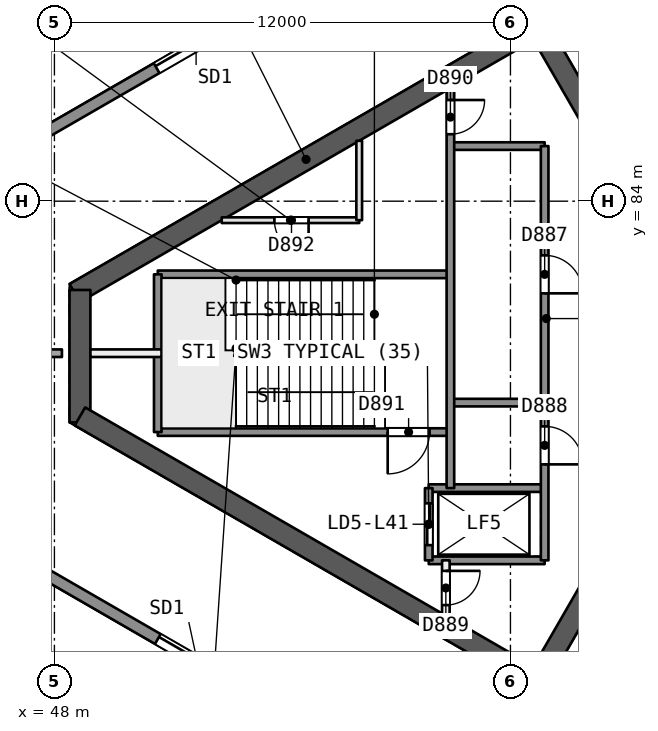
"""IFC4 building model, lengths in metres.
Left out: names, types, materials, properties, quantities, classifications, styles, units other than length and angle.
Written with IfcOpenShell. Run it as: python <this file> out.ifc"""

import sys

from ifc_helpers import new_model, si_unit, direction, frame, frame_2d, origin, place, context, subcontext, project, spatial, rectangle, extrude, element, fill, save


model = new_model("IFC4")
c1 = context("Model", 3, precision=1e-05, world=origin(), true_north=direction((0.0, 1.0)))
c2 = subcontext(c1, "Body", "Model", "MODEL_VIEW")
j1 = project(units=[si_unit("LENGTHUNIT", "METRE"), si_unit("PLANEANGLEUNIT", "RADIAN")], contexts=[c1])
p1 = place(None, origin())
s1 = spatial("IfcSite", under=j1, at=p1, CompositionType="ELEMENT")
p2 = place(p1, origin())
s2 = spatial("IfcBuilding", under=s1, at=p2, CompositionType="ELEMENT")
p3 = place(p2, frame((0.0, 0.0, 171.1)))
s3 = spatial("IfcBuildingStorey", under=s2, at=p3, CompositionType="ELEMENT", Elevation=171.1)
p4 = place(p3, frame((65.682, 80.0, 0.0), z_axis=(0.0, 0.0, 1.0), x_axis=(-0.500000202252, 0.866025287014, 0.0)))
e1 = element("IfcWall", 1, at=p4, inside=s3, PredefinedType="SHEAR", context=c2, shape_type="SweptSolid", body=[
    extrude(rectangle(XDim=10.221, YDim=0.55, at=frame_2d((5.111, 0.0))), origin(), (0.0, 0.0, 1.0), 3.7),
])
p5 = place(p4, frame((0.791, 0.0, 0.0)))
e2 = element("IfcOpeningElement", 2, at=p5, cuts=e1, PredefinedType="OPENING", context=c2, shape_type="SweptSolid", body=[
    extrude(rectangle(XDim=1.2, YDim=2.1, at=frame_2d((0.6, 1.05))), frame((0.0, 0.286, 0.0), z_axis=(0.0, -1.0, 0.0), x_axis=(1.0, 0.0, 0.0)), (0.0, 0.0, 1.0), 0.571),
])
p6 = place(p3, frame((60.709, 88.614, 0.0), z_axis=(0.0, 0.0, 1.0), x_axis=(-0.866020164116, -0.500009075263, 0.0)))
e3 = element("IfcWall", 3, at=p6, inside=s3, PredefinedType="SHEAR", context=c2, shape_type="SweptSolid", body=[
    extrude(rectangle(XDim=14.058, YDim=0.55, at=frame_2d((7.029, 0.0))), origin(), (0.0, 0.0, 1.0), 3.7),
])
p7 = place(p3, frame((48.672, 81.664, 0.0), z_axis=(0.0, 0.0, 1.0), x_axis=(0.0, -1.0, 0.0)))
e4 = element("IfcWall", 4, at=p7, inside=s3, PredefinedType="SHEAR", context=c2, shape_type="SweptSolid", body=[
    extrude(rectangle(XDim=3.487, YDim=0.55, at=frame_2d((1.743, 0.0))), origin(), (0.0, 0.0, 1.0), 3.7),
])
p8 = place(p3, frame((48.672, 78.336, 0.0), z_axis=(0.0, 0.0, 1.0), x_axis=(0.866023530946, -0.500003243837, 0.0)))
e5 = element("IfcWall", 5, at=p8, inside=s3, PredefinedType="SHEAR", context=c2, shape_type="SweptSolid", body=[
    extrude(rectangle(XDim=14.175, YDim=0.55, at=frame_2d((7.087, 0.0))), origin(), (0.0, 0.0, 1.0), 3.7),
])
p9 = place(p3, frame((60.709, 71.386, 0.0), z_axis=(0.0, 0.0, 1.0), x_axis=(0.500015938302, 0.866016201606, 0.0)))
e6 = element("IfcWall", 6, at=p9, inside=s3, PredefinedType="SHEAR", context=c2, shape_type="SweptSolid", body=[
    extrude(rectangle(XDim=10.105, YDim=0.55, at=frame_2d((5.053, 0.0))), origin(), (0.0, 0.0, 1.0), 3.7),
])
p10 = place(p9, frame((7.955, 0.0, 0.0)))
e7 = element("IfcOpeningElement", 7, at=p10, cuts=e6, PredefinedType="OPENING", context=c2, shape_type="SweptSolid", body=[
    extrude(rectangle(XDim=1.2, YDim=2.1, at=frame_2d((0.6, 1.05))), frame((0.0, 0.286, 0.0), z_axis=(0.0, -1.0, 0.0), x_axis=(1.0, 0.0, 0.0)), (0.0, 0.0, 1.0), 0.571),
])
p11 = place(p3, frame((66.129, 83.077, 0.0), z_axis=(0.0, 0.0, 1.0), x_axis=(-0.5000018851, 0.866024315419, 0.0)))
e8 = element("IfcWall", 8, at=p11, inside=s3, PredefinedType="PARTITIONING", context=c2, shape_type="SweptSolid", body=[
    extrude(rectangle(XDim=9.0, YDim=0.2, at=frame_2d((4.5, 0.0))), origin(), (0.0, 0.0, 1.0), 3.25),
])
p12 = place(p3, frame((42.599, 80.0, 0.0), z_axis=(0.0, 0.0, 1.0), x_axis=(1.0, 0.0, 0.0)))
e9 = element("IfcWall", 9, at=p12, inside=s3, PredefinedType="PARTITIONING", context=c2, shape_type="SweptSolid", body=[
    extrude(rectangle(XDim=5.599, YDim=0.2, at=frame_2d((2.8, 0.0))), origin(), (0.0, 0.0, 1.0), 3.25),
])
p13 = place(p3, frame((42.45, 82.744, 0.0), z_axis=(0.0, 0.0, 1.0), x_axis=(0.866024128163, 0.500002209434, 0.0)))
e10 = element("IfcWall", 10, at=p13, inside=s3, PredefinedType="SOLIDWALL", context=c2, shape_type="SweptSolid", body=[
    extrude(rectangle(XDim=53.635, YDim=0.3, at=frame_2d((26.817, 0.0))), origin(), (0.0, 0.0, 1.0), 3.25),
])
p14 = place(p13, frame((20.473, 0.0, 0.0)))
e11 = element("IfcOpeningElement", 11, at=p14, cuts=e10, PredefinedType="OPENING", context=c2, shape_type="SweptSolid", body=[
    extrude(rectangle(XDim=2.4, YDim=2.4, at=frame_2d((1.2, 1.2))), frame((0.0, 0.161, 0.0), z_axis=(0.0, -1.0, 0.0), x_axis=(1.0, 0.0, 0.0)), (0.0, 0.0, 1.0), 0.321),
])
p15 = place(p13, frame((9.514, 0.0, 0.0)))
e12 = element("IfcOpeningElement", 12, at=p15, cuts=e10, PredefinedType="OPENING", context=c2, shape_type="SweptSolid", body=[
    extrude(rectangle(XDim=2.4, YDim=2.4, at=frame_2d((1.2, 1.2))), frame((0.0, 0.161, 0.0), z_axis=(0.0, -1.0, 0.0), x_axis=(1.0, 0.0, 0.0)), (0.0, 0.0, 1.0), 0.321),
])
p16 = place(p13, frame((40.628, 0.0, 0.0)))
e13 = element("IfcOpeningElement", 13, at=p16, cuts=e10, PredefinedType="OPENING", context=c2, shape_type="SweptSolid", body=[
    extrude(rectangle(XDim=2.4, YDim=2.4, at=frame_2d((1.2, 1.2))), frame((0.0, 0.161, 0.0), z_axis=(0.0, -1.0, 0.0), x_axis=(1.0, 0.0, 0.0)), (0.0, 0.0, 1.0), 0.321),
])
p17 = place(p13, frame((27.632, 0.0, 0.9)))
e14 = element("IfcOpeningElement", 14, at=p17, cuts=e10, PredefinedType="OPENING", context=c2, shape_type="SweptSolid", body=[
    extrude(rectangle(XDim=1.8, YDim=1.5, at=frame_2d((0.9, 0.75))), frame((0.0, 0.161, 0.0), z_axis=(0.0, -1.0, 0.0), x_axis=(1.0, 0.0, 0.0)), (0.0, 0.0, 1.0), 0.321),
])
p18 = place(p13, frame((24.826, 0.0, 0.9)))
e15 = element("IfcOpeningElement", 15, at=p18, cuts=e10, PredefinedType="OPENING", context=c2, shape_type="SweptSolid", body=[
    extrude(rectangle(XDim=1.8, YDim=1.5, at=frame_2d((0.9, 0.75))), frame((0.0, 0.161, 0.0), z_axis=(0.0, -1.0, 0.0), x_axis=(1.0, 0.0, 0.0)), (0.0, 0.0, 1.0), 0.321),
])
p19 = place(p3, frame((88.899, 50.439, 0.0), z_axis=(0.0, 0.0, 1.0), x_axis=(-0.866024128163, 0.500002209434, 0.0)))
e16 = element("IfcWall", 16, at=p19, inside=s3, PredefinedType="SOLIDWALL", context=c2, shape_type="SweptSolid", body=[
    extrude(rectangle(XDim=53.635, YDim=0.3, at=frame_2d((26.817, 0.0))), origin(), (0.0, 0.0, 1.0), 3.25),
])
p20 = place(p19, frame((30.45, 0.0, 0.0)))
e17 = element("IfcOpeningElement", 17, at=p20, cuts=e16, PredefinedType="OPENING", context=c2, shape_type="SweptSolid", body=[
    extrude(rectangle(XDim=2.4, YDim=2.4, at=frame_2d((1.2, 1.2))), frame((0.0, 0.161, 0.0), z_axis=(0.0, -1.0, 0.0), x_axis=(1.0, 0.0, 0.0)), (0.0, 0.0, 1.0), 0.321),
])
p21 = place(p19, frame((41.683, 0.0, 0.0)))
e18 = element("IfcOpeningElement", 18, at=p21, cuts=e16, PredefinedType="OPENING", context=c2, shape_type="SweptSolid", body=[
    extrude(rectangle(XDim=2.4, YDim=2.4, at=frame_2d((1.2, 1.2))), frame((0.0, 0.161, 0.0), z_axis=(0.0, -1.0, 0.0), x_axis=(1.0, 0.0, 0.0)), (0.0, 0.0, 1.0), 0.321),
])
p22 = place(p19, frame((10.295, 0.0, 0.0)))
e19 = element("IfcOpeningElement", 19, at=p22, cuts=e16, PredefinedType="OPENING", context=c2, shape_type="SweptSolid", body=[
    extrude(rectangle(XDim=2.4, YDim=2.4, at=frame_2d((1.2, 1.2))), frame((0.0, 0.161, 0.0), z_axis=(0.0, -1.0, 0.0), x_axis=(1.0, 0.0, 0.0)), (0.0, 0.0, 1.0), 0.321),
])
p23 = place(p19, frame((24.982, 0.0, 0.9)))
e20 = element("IfcOpeningElement", 20, at=p23, cuts=e16, PredefinedType="OPENING", context=c2, shape_type="SweptSolid", body=[
    extrude(rectangle(XDim=1.8, YDim=1.5, at=frame_2d((0.9, 0.75))), frame((0.0, 0.161, 0.0), z_axis=(0.0, -1.0, 0.0), x_axis=(1.0, 0.0, 0.0)), (0.0, 0.0, 1.0), 0.321),
])
p24 = place(p3, frame((60.9, 85.45, 0.0), z_axis=(0.0, 0.0, 1.0), x_axis=(-1.0, 0.0, 0.0)))
e21 = element("IfcWall", 21, at=p24, inside=s3, PredefinedType="SOLIDWALL", context=c2, shape_type="SweptSolid", body=[
    extrude(rectangle(XDim=2.48, YDim=0.2, at=frame_2d((1.24, 0.0))), origin(), (0.0, 0.0, 1.0), 3.25),
])
p25 = place(p3, frame((56.02, 83.5, 0.0), z_axis=(0.0, 0.0, 1.0), x_axis=(-1.0, 0.0, 0.0)))
e22 = element("IfcWall", 22, at=p25, inside=s3, PredefinedType="PARTITIONING", context=c2, shape_type="SweptSolid", body=[
    extrude(rectangle(XDim=3.618, YDim=0.15, at=frame_2d((1.809, 0.0))), origin(), (0.0, 0.0, 1.0), 3.25),
])
p26 = place(p25, frame((1.332, 0.0, 0.0)))
e23 = element("IfcOpeningElement", 23, at=p26, cuts=e22, PredefinedType="OPENING", context=c2, shape_type="SweptSolid", body=[
    extrude(rectangle(XDim=0.9, YDim=2.1, at=frame_2d((0.45, 1.05))), frame((0.0, 0.085, 0.0), z_axis=(0.0, -1.0, 0.0), x_axis=(1.0, 0.0, 0.0)), (0.0, 0.0, 1.0), 0.171),
])
p27 = place(p3, frame((58.42, 82.075, 0.0), z_axis=(0.0, 0.0, 1.0), x_axis=(-1.0, 0.0, 0.0)))
e24 = element("IfcWall", 24, at=p27, inside=s3, PredefinedType="SOLIDWALL", context=c2, shape_type="SweptSolid", body=[
    extrude(rectangle(XDim=7.7, YDim=0.2, at=frame_2d((3.85, 0.0))), origin(), (0.0, 0.0, 1.0), 3.25),
])
p28 = place(p3, frame((50.82, 80.0, 0.0), z_axis=(0.0, 0.0, 1.0), x_axis=(-1.0, 0.0, 0.0)))
e25 = element("IfcWall", 25, at=p28, inside=s3, PredefinedType="PARTITIONING", context=c2, shape_type="SweptSolid", body=[
    extrude(rectangle(XDim=1.873, YDim=0.2, at=frame_2d((0.937, 0.0))), origin(), (0.0, 0.0, 1.0), 3.25),
])
p29 = place(p3, frame((60.9, 78.7, 0.0), z_axis=(0.0, 0.0, 1.0), x_axis=(-1.0, 0.0, 0.0)))
e26 = element("IfcWall", 26, at=p29, inside=s3, PredefinedType="SOLIDWALL", context=c2, shape_type="SweptSolid", body=[
    extrude(rectangle(XDim=2.48, YDim=0.2, at=frame_2d((1.24, 0.0))), origin(), (0.0, 0.0, 1.0), 3.25),
])
p30 = place(p3, frame((58.42, 77.925, 0.0), z_axis=(0.0, 0.0, 1.0), x_axis=(-1.0, 0.0, 0.0)))
e27 = element("IfcWall", 27, at=p30, inside=s3, PredefinedType="SOLIDWALL", context=c2, shape_type="SweptSolid", body=[
    extrude(rectangle(XDim=7.7, YDim=0.2, at=frame_2d((3.85, 0.0))), origin(), (0.0, 0.0, 1.0), 3.25),
])
p31 = place(p30, frame((0.55, 0.0, 0.0)))
e28 = element("IfcOpeningElement", 28, at=p31, cuts=e27, PredefinedType="OPENING", context=c2, shape_type="SweptSolid", body=[
    extrude(rectangle(XDim=1.1, YDim=2.1, at=frame_2d((0.55, 1.05))), frame((0.0, 0.11, 0.0), z_axis=(0.0, -1.0, 0.0), x_axis=(1.0, 0.0, 0.0)), (0.0, 0.0, 1.0), 0.221),
])
for number, where, z_axis, x_axis in (
    (29, (60.9, 76.45, 0.0), (0.0, 0.0, 1.0), (-1.0, 0.0, 0.0)),
    (30, (60.9, 74.55, 0.0), (0.0, 0.0, 1.0), (-1.0, 0.0, 0.0)),
):
    element("IfcWall", number, at=place(p3, frame(where, z_axis=z_axis, x_axis=x_axis)), inside=s3, PredefinedType="SOLIDWALL", context=c2, shape_type="SweptSolid", body=[
        extrude(rectangle(XDim=3.05, YDim=0.2, at=frame_2d((1.525, 0.0))), origin(), (0.0, 0.0, 1.0), 3.25),
    ])
p32 = place(p3, frame((60.9, 85.45, 0.0), z_axis=(0.0, 0.0, 1.0), x_axis=(0.0, -1.0, 0.0)))
e31 = element("IfcWall", 31, at=p32, inside=s3, PredefinedType="SOLIDWALL", context=c2, shape_type="SweptSolid", body=[
    extrude(rectangle(XDim=10.9, YDim=0.2, at=frame_2d((5.45, 0.0))), origin(), (0.0, 0.0, 1.0), 3.25),
])
p33 = place(p32, frame((2.875, 0.0, 0.0)))
e32 = element("IfcOpeningElement", 32, at=p33, cuts=e31, PredefinedType="OPENING", context=c2, shape_type="SweptSolid", body=[
    extrude(rectangle(XDim=1.0, YDim=2.1, at=frame_2d((0.5, 1.05))), frame((0.0, 0.11, 0.0), z_axis=(0.0, -1.0, 0.0), x_axis=(1.0, 0.0, 0.0)), (0.0, 0.0, 1.0), 0.221),
])
p34 = place(p32, frame((7.375, 0.0, 0.0)))
e33 = element("IfcOpeningElement", 33, at=p34, cuts=e31, PredefinedType="OPENING", context=c2, shape_type="SweptSolid", body=[
    extrude(rectangle(XDim=1.0, YDim=2.1, at=frame_2d((0.5, 1.05))), frame((0.0, 0.11, 0.0), z_axis=(0.0, -1.0, 0.0), x_axis=(1.0, 0.0, 0.0)), (0.0, 0.0, 1.0), 0.221),
])
p35 = place(p3, frame((58.42, 86.974, 0.0), z_axis=(0.0, 0.0, 1.0), x_axis=(0.0, -1.0, 0.0)))
e34 = element("IfcWall", 34, at=p35, inside=s3, PredefinedType="SOLIDWALL", context=c2, shape_type="SweptSolid", body=[
    extrude(rectangle(XDim=10.524, YDim=0.2, at=frame_2d((5.262, 0.0))), origin(), (0.0, 0.0, 1.0), 3.25),
])
p36 = place(p35, frame((0.312, 0.0, 0.0)))
e35 = element("IfcOpeningElement", 35, at=p36, cuts=e34, PredefinedType="OPENING", context=c2, shape_type="SweptSolid", body=[
    extrude(rectangle(XDim=0.9, YDim=2.1, at=frame_2d((0.45, 1.05))), frame((0.0, 0.11, 0.0), z_axis=(0.0, -1.0, 0.0), x_axis=(1.0, 0.0, 0.0)), (0.0, 0.0, 1.0), 0.221),
])
p37 = place(p3, frame((58.3, 74.55, 0.0), z_axis=(0.0, 0.0, 1.0), x_axis=(0.0, -1.0, 0.0)))
e36 = element("IfcWall", 36, at=p37, inside=s3, PredefinedType="PARTITIONING", context=c2, shape_type="SweptSolid", body=[
    extrude(rectangle(XDim=1.455, YDim=0.2, at=frame_2d((0.728, 0.0))), origin(), (0.0, 0.0, 1.0), 3.25),
])
p38 = place(p37, frame((0.278, 0.0, 0.0)))
e37 = element("IfcOpeningElement", 37, at=p38, cuts=e36, PredefinedType="OPENING", context=c2, shape_type="SweptSolid", body=[
    extrude(rectangle(XDim=0.9, YDim=2.1, at=frame_2d((0.45, 1.05))), frame((0.0, 0.11, 0.0), z_axis=(0.0, -1.0, 0.0), x_axis=(1.0, 0.0, 0.0)), (0.0, 0.0, 1.0), 0.221),
])
p39 = place(p3, frame((57.85, 76.45, 0.0), z_axis=(0.0, 0.0, 1.0), x_axis=(0.0, -1.0, 0.0)))
e38 = element("IfcWall", 38, at=p39, inside=s3, PredefinedType="SOLIDWALL", context=c2, shape_type="SweptSolid", body=[
    extrude(rectangle(XDim=1.9, YDim=0.2, at=frame_2d((0.95, 0.0))), origin(), (0.0, 0.0, 1.0), 3.25),
])
p40 = place(p39, frame((0.4, 0.0, 0.0)))
e39 = element("IfcOpeningElement", 39, at=p40, cuts=e38, PredefinedType="OPENING", context=c2, shape_type="SweptSolid", body=[
    extrude(rectangle(XDim=1.1, YDim=2.1, at=frame_2d((0.55, 1.05))), frame((0.0, 0.11, 0.0), z_axis=(0.0, -1.0, 0.0), x_axis=(1.0, 0.0, 0.0)), (0.0, 0.0, 1.0), 0.221),
])
p41 = place(p3, frame((56.02, 85.589, 0.0), z_axis=(0.0, 0.0, 1.0), x_axis=(0.0, -1.0, 0.0)))
e40 = element("IfcWall", 40, at=p41, inside=s3, PredefinedType="PARTITIONING", context=c2, shape_type="SweptSolid", body=[
    extrude(rectangle(XDim=2.089, YDim=0.15, at=frame_2d((1.044, 0.0))), origin(), (0.0, 0.0, 1.0), 3.25),
])
p42 = place(p3, frame((50.72, 82.075, 0.0), z_axis=(0.0, 0.0, 1.0), x_axis=(0.0, -1.0, 0.0)))
e41 = element("IfcWall", 41, at=p42, inside=s3, PredefinedType="SOLIDWALL", context=c2, shape_type="SweptSolid", body=[
    extrude(rectangle(XDim=4.15, YDim=0.2, at=frame_2d((2.075, 0.0))), origin(), (0.0, 0.0, 1.0), 3.25),
])
p43 = place(p15, origin())
e42 = element("IfcDoor", 42, at=p43, inside=s3, OperationType="SLIDING_TO_RIGHT", PredefinedType="NOTDEFINED", context=c2, shape_type="SweptSolid", body=[
    extrude(rectangle(XDim=2.4, YDim=2.4, at=frame_2d((1.2, 1.2))), frame((0.0, 0.025, 0.0), z_axis=(0.0, -1.0, 0.0), x_axis=(1.0, 0.0, 0.0)), (0.0, 0.0, 1.0), 0.05),
])
fill(e12, e42)
p44 = place(p21, origin())
e43 = element("IfcDoor", 43, at=p44, inside=s3, OperationType="SLIDING_TO_RIGHT", PredefinedType="NOTDEFINED", context=c2, shape_type="SweptSolid", body=[
    extrude(rectangle(XDim=2.4, YDim=2.4, at=frame_2d((1.2, 1.2))), frame((0.0, 0.025, 0.0), z_axis=(0.0, -1.0, 0.0), x_axis=(1.0, 0.0, 0.0)), (0.0, 0.0, 1.0), 0.05),
])
fill(e18, e43)
p45 = place(p40, origin())
e44 = element("IfcDoor", 44, at=p45, inside=s3, OperationType="SLIDING_TO_RIGHT", PredefinedType="NOTDEFINED", context=c2, shape_type="SweptSolid", body=[
    extrude(rectangle(XDim=1.1, YDim=2.1, at=frame_2d((0.55, 1.05))), frame((0.0, 0.025, 0.0), z_axis=(0.0, -1.0, 0.0), x_axis=(1.0, 0.0, 0.0)), (0.0, 0.0, 1.0), 0.05),
])
fill(e39, e44)
p46 = place(p33, origin())
e45 = element("IfcDoor", 45, at=p46, inside=s3, OperationType="SINGLE_SWING_RIGHT", PredefinedType="NOTDEFINED", context=c2, shape_type="SweptSolid", body=[
    extrude(rectangle(XDim=1.0, YDim=2.1, at=frame_2d((0.5, 1.05))), frame((0.0, 0.025, 0.0), z_axis=(0.0, -1.0, 0.0), x_axis=(1.0, 0.0, 0.0)), (0.0, 0.0, 1.0), 0.05),
])
fill(e32, e45)
p47 = place(p34, origin())
e46 = element("IfcDoor", 46, at=p47, inside=s3, OperationType="SINGLE_SWING_RIGHT", PredefinedType="NOTDEFINED", context=c2, shape_type="SweptSolid", body=[
    extrude(rectangle(XDim=1.0, YDim=2.1, at=frame_2d((0.5, 1.05))), frame((0.0, 0.025, 0.0), z_axis=(0.0, -1.0, 0.0), x_axis=(1.0, 0.0, 0.0)), (0.0, 0.0, 1.0), 0.05),
])
fill(e33, e46)
p48 = place(p38, origin())
e47 = element("IfcDoor", 47, at=p48, inside=s3, OperationType="SINGLE_SWING_LEFT", PredefinedType="NOTDEFINED", context=c2, shape_type="SweptSolid", body=[
    extrude(rectangle(XDim=0.9, YDim=2.1, at=frame_2d((0.45, 1.05))), frame((0.0, 0.025, 0.0), z_axis=(0.0, -1.0, 0.0), x_axis=(1.0, 0.0, 0.0)), (0.0, 0.0, 1.0), 0.05),
])
fill(e37, e47)
p49 = place(p36, origin())
e48 = element("IfcDoor", 48, at=p49, inside=s3, OperationType="SINGLE_SWING_LEFT", PredefinedType="NOTDEFINED", context=c2, shape_type="SweptSolid", body=[
    extrude(rectangle(XDim=0.9, YDim=2.1, at=frame_2d((0.45, 1.05))), frame((0.0, 0.025, 0.0), z_axis=(0.0, -1.0, 0.0), x_axis=(1.0, 0.0, 0.0)), (0.0, 0.0, 1.0), 0.05),
])
fill(e35, e48)
p50 = place(p31, origin())
e49 = element("IfcDoor", 49, at=p50, inside=s3, OperationType="SINGLE_SWING_RIGHT", PredefinedType="NOTDEFINED", context=c2, shape_type="SweptSolid", body=[
    extrude(rectangle(XDim=1.1, YDim=2.1, at=frame_2d((0.55, 1.05))), frame((0.0, 0.025, 0.0), z_axis=(0.0, -1.0, 0.0), x_axis=(1.0, 0.0, 0.0)), (0.0, 0.0, 1.0), 0.05),
])
fill(e28, e49)
p51 = place(p26, origin())
e50 = element("IfcDoor", 50, at=p51, inside=s3, OperationType="SINGLE_SWING_LEFT", PredefinedType="NOTDEFINED", context=c2, shape_type="SweptSolid", body=[
    extrude(rectangle(XDim=0.9, YDim=2.1, at=frame_2d((0.45, 1.05))), frame((0.0, 0.025, 0.0), z_axis=(0.0, -1.0, 0.0), x_axis=(1.0, 0.0, 0.0)), (0.0, 0.0, 1.0), 0.05),
])
fill(e23, e50)
save(model, sys.argv[1])
